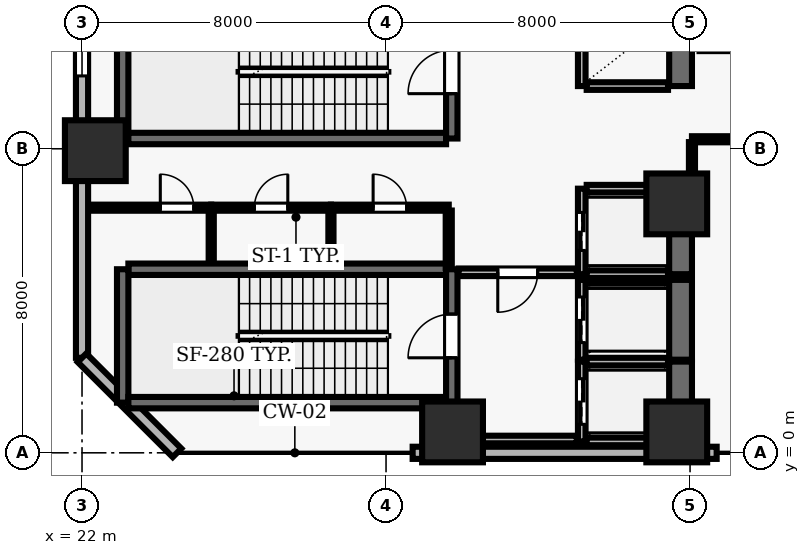
"""IFC4 building model, lengths in metres.
Left out: names, types, materials, properties, quantities, classifications, styles, units other than length and angle.
Written with IfcOpenShell. Run it as: python <this file> out.ifc"""

import sys

from ifc_helpers import new_model, si_unit, direction, frame, frame_2d, origin, origin_2d, place, context, subcontext, project, spatial, rectangle, extrude, element, fill, save


model = new_model("IFC4")
c1 = context("Model", 3, precision=1e-05, world=origin(), true_north=direction((0.0, 1.0)))
c2 = subcontext(c1, "Body", "Model", "MODEL_VIEW")
j1 = project(units=[si_unit("LENGTHUNIT", "METRE"), si_unit("PLANEANGLEUNIT", "RADIAN")], contexts=[c1])
p1 = place(None, origin())
s1 = spatial("IfcSite", under=j1, at=p1, CompositionType="ELEMENT")
p2 = place(p1, origin())
s2 = spatial("IfcBuilding", under=s1, at=p2, CompositionType="ELEMENT")
p3 = place(p2, frame((0.0, 0.0, 20.8)))
s3 = spatial("IfcBuildingStorey", under=s2, at=p3, CompositionType="ELEMENT", Elevation=20.8)
for number, where, z_axis, x_axis in (
    (1, (31.75, 0.55, 0.0), (0.0, 0.0, 1.0), (1.0, 0.0, 0.0)),
    (2, (37.65, 0.55, 0.0), (0.0, 0.0, 1.0), (1.0, 0.0, 0.0)),
    (3, (22.35, 7.95, 0.0), (0.0, 0.0, 1.0), (1.0, 0.0, 0.0)),
    (4, (37.65, 6.55, 0.0), (0.0, 0.0, 1.0), (1.0, 0.0, 0.0)),
):
    element("IfcColumn", number, at=place(p3, frame(where, z_axis=z_axis, x_axis=x_axis)), inside=s3, PredefinedType="COLUMN", context=c2, shape_type="SweptSolid", body=[
        extrude(rectangle(XDim=1.6, YDim=1.6, at=origin_2d()), origin(), (0.0, 0.0, 1.0), 5.2),
    ])
p4 = place(p3, frame((30.7, 0.0, 0.0), z_axis=(0.0, 0.0, 1.0), x_axis=(1.0, 0.0, 0.0)))
e5 = element("IfcWall", 5, at=p4, inside=s3, PredefinedType="SOLIDWALL", context=c2, shape_type="SweptSolid", body=[
    extrude(rectangle(XDim=8.0, YDim=0.32, at=frame_2d((4.0, 0.0))), origin(), (0.0, 0.0, 1.0), 4.78),
])
p5 = place(p3, frame((22.0, 51.5, 0.0), z_axis=(0.0, 0.0, 1.0), x_axis=(0.0, -1.0, 0.0)))
e6 = element("IfcWall", 6, at=p5, inside=s3, PredefinedType="SOLIDWALL", context=c2, shape_type="SweptSolid", body=[
    extrude(rectangle(XDim=49.0, YDim=0.32, at=frame_2d((24.5, 0.0))), origin(), (0.0, 0.0, 1.0), 4.78),
])
p6 = place(p5, frame((1.972, 0.0, 0.9)))
e7 = element("IfcOpeningElement", 7, at=p6, cuts=e6, PredefinedType="OPENING", context=c2, shape_type="SweptSolid", body=[
    extrude(rectangle(XDim=1.5, YDim=1.6, at=frame_2d((0.75, 0.8))), frame((0.0, 0.17, 0.0), z_axis=(0.0, -1.0, 0.0), x_axis=(1.0, 0.0, 0.0)), (0.0, 0.0, 1.0), 0.34),
])
p7 = place(p5, frame((7.417, 0.0, 0.9)))
e8 = element("IfcOpeningElement", 8, at=p7, cuts=e6, PredefinedType="OPENING", context=c2, shape_type="SweptSolid", body=[
    extrude(rectangle(XDim=1.5, YDim=1.6, at=frame_2d((0.75, 0.8))), frame((0.0, 0.17, 0.0), z_axis=(0.0, -1.0, 0.0), x_axis=(1.0, 0.0, 0.0)), (0.0, 0.0, 1.0), 0.34),
])
p8 = place(p5, frame((12.861, 0.0, 0.9)))
e9 = element("IfcOpeningElement", 9, at=p8, cuts=e6, PredefinedType="OPENING", context=c2, shape_type="SweptSolid", body=[
    extrude(rectangle(XDim=1.5, YDim=1.6, at=frame_2d((0.75, 0.8))), frame((0.0, 0.17, 0.0), z_axis=(0.0, -1.0, 0.0), x_axis=(1.0, 0.0, 0.0)), (0.0, 0.0, 1.0), 0.34),
])
p9 = place(p5, frame((18.306, 0.0, 0.9)))
e10 = element("IfcOpeningElement", 10, at=p9, cuts=e6, PredefinedType="OPENING", context=c2, shape_type="SweptSolid", body=[
    extrude(rectangle(XDim=1.5, YDim=1.6, at=frame_2d((0.75, 0.8))), frame((0.0, 0.17, 0.0), z_axis=(0.0, -1.0, 0.0), x_axis=(1.0, 0.0, 0.0)), (0.0, 0.0, 1.0), 0.34),
])
p10 = place(p5, frame((23.3, 0.0, 0.9)))
e11 = element("IfcOpeningElement", 11, at=p10, cuts=e6, PredefinedType="OPENING", context=c2, shape_type="SweptSolid", body=[
    extrude(rectangle(XDim=1.5, YDim=1.6, at=frame_2d((0.75, 0.8))), frame((0.0, 0.17, 0.0), z_axis=(0.0, -1.0, 0.0), x_axis=(1.0, 0.0, 0.0)), (0.0, 0.0, 1.0), 0.34),
])
p11 = place(p5, frame((29.194, 0.0, 0.9)))
e12 = element("IfcOpeningElement", 12, at=p11, cuts=e6, PredefinedType="OPENING", context=c2, shape_type="SweptSolid", body=[
    extrude(rectangle(XDim=1.5, YDim=1.6, at=frame_2d((0.75, 0.8))), frame((0.0, 0.17, 0.0), z_axis=(0.0, -1.0, 0.0), x_axis=(1.0, 0.0, 0.0)), (0.0, 0.0, 1.0), 0.34),
])
p12 = place(p5, frame((34.189, 0.0, 0.9)))
e13 = element("IfcOpeningElement", 13, at=p12, cuts=e6, PredefinedType="OPENING", context=c2, shape_type="SweptSolid", body=[
    extrude(rectangle(XDim=1.5, YDim=1.6, at=frame_2d((0.75, 0.8))), frame((0.0, 0.17, 0.0), z_axis=(0.0, -1.0, 0.0), x_axis=(1.0, 0.0, 0.0)), (0.0, 0.0, 1.0), 0.34),
])
p13 = place(p5, frame((40.083, 0.0, 0.9)))
e14 = element("IfcOpeningElement", 14, at=p13, cuts=e6, PredefinedType="OPENING", context=c2, shape_type="SweptSolid", body=[
    extrude(rectangle(XDim=1.5, YDim=1.6, at=frame_2d((0.75, 0.8))), frame((0.0, 0.17, 0.0), z_axis=(0.0, -1.0, 0.0), x_axis=(1.0, 0.0, 0.0)), (0.0, 0.0, 1.0), 0.34),
])
p14 = place(p3, frame((22.0, 2.5, 0.0), z_axis=(0.0, 0.0, 1.0), x_axis=(0.707106781187, -0.707106781187, 0.0)))
e15 = element("IfcWall", 15, at=p14, inside=s3, PredefinedType="SOLIDWALL", context=c2, shape_type="SweptSolid", body=[
    extrude(rectangle(XDim=3.536, YDim=0.32, at=frame_2d((1.768, 0.0))), origin(), (0.0, 0.0, 1.0), 4.78),
])
p15 = place(p3, frame((31.58, 4.83, 0.0), z_axis=(0.0, 0.0, 1.0), x_axis=(-1.0, 0.0, 0.0)))
e16 = element("IfcWall", 16, at=p15, inside=s3, PredefinedType="SHEAR", context=c2, shape_type="SweptSolid", body=[
    extrude(rectangle(XDim=8.36, YDim=0.3, at=frame_2d((4.18, 0.0))), origin(), (0.0, 0.0, 1.0), 4.78),
])
p16 = place(p3, frame((23.07, 4.83, 0.0), z_axis=(0.0, 0.0, 1.0), x_axis=(0.0, -1.0, 0.0)))
e17 = element("IfcWall", 17, at=p16, inside=s3, PredefinedType="SHEAR", context=c2, shape_type="SweptSolid", body=[
    extrude(rectangle(XDim=3.51, YDim=0.3, at=frame_2d((1.755, 0.0))), origin(), (0.0, 0.0, 1.0), 4.78),
])
p17 = place(p3, frame((23.22, 1.32, 0.0), z_axis=(0.0, 0.0, 1.0), x_axis=(1.0, 0.0, 0.0)))
e18 = element("IfcWall", 18, at=p17, inside=s3, PredefinedType="SHEAR", context=c2, shape_type="SweptSolid", body=[
    extrude(rectangle(XDim=8.36, YDim=0.3, at=frame_2d((4.18, 0.0))), origin(), (0.0, 0.0, 1.0), 4.78),
])
p18 = place(p3, frame((31.73, 0.96, 0.0), z_axis=(0.0, 0.0, 1.0), x_axis=(0.0, 1.0, 0.0)))
e19 = element("IfcWall", 19, at=p18, inside=s3, PredefinedType="SHEAR", context=c2, shape_type="SweptSolid", body=[
    extrude(rectangle(XDim=3.87, YDim=0.3, at=frame_2d((1.935, 0.0))), origin(), (0.0, 0.0, 1.0), 4.78),
])
p19 = place(p18, frame((1.54, 0.0, 0.0)))
e20 = element("IfcOpeningElement", 20, at=p19, cuts=e19, PredefinedType="OPENING", context=c2, shape_type="SweptSolid", body=[
    extrude(rectangle(XDim=1.15, YDim=2.15, at=frame_2d((0.575, 1.075))), frame((0.0, 0.16, 0.0), z_axis=(0.0, -1.0, 0.0), x_axis=(1.0, 0.0, 0.0)), (0.0, 0.0, 1.0), 0.32),
])
p20 = place(p3, frame((23.07, 11.78, 0.0), z_axis=(0.0, 0.0, 1.0), x_axis=(0.0, -1.0, 0.0)))
e21 = element("IfcWall", 21, at=p20, inside=s3, PredefinedType="SHEAR", context=c2, shape_type="SweptSolid", body=[
    extrude(rectangle(XDim=3.51, YDim=0.3, at=frame_2d((1.755, 0.0))), origin(), (0.0, 0.0, 1.0), 4.78),
])
p21 = place(p3, frame((23.22, 8.27, 0.0), z_axis=(0.0, 0.0, 1.0), x_axis=(1.0, 0.0, 0.0)))
e22 = element("IfcWall", 22, at=p21, inside=s3, PredefinedType="SHEAR", context=c2, shape_type="SweptSolid", body=[
    extrude(rectangle(XDim=8.36, YDim=0.3, at=frame_2d((4.18, 0.0))), origin(), (0.0, 0.0, 1.0), 4.78),
])
p22 = place(p3, frame((31.73, 8.27, 0.0), z_axis=(0.0, 0.0, 1.0), x_axis=(0.0, 1.0, 0.0)))
e23 = element("IfcWall", 23, at=p22, inside=s3, PredefinedType="SHEAR", context=c2, shape_type="SweptSolid", body=[
    extrude(rectangle(XDim=3.51, YDim=0.3, at=frame_2d((1.755, 0.0))), origin(), (0.0, 0.0, 1.0), 4.78),
])
p23 = place(p22, frame((1.18, 0.0, 0.0)))
e24 = element("IfcOpeningElement", 24, at=p23, cuts=e23, PredefinedType="OPENING", context=c2, shape_type="SweptSolid", body=[
    extrude(rectangle(XDim=1.15, YDim=2.15, at=frame_2d((0.575, 1.075))), frame((0.0, 0.16, 0.0), z_axis=(0.0, -1.0, 0.0), x_axis=(1.0, 0.0, 0.0)), (0.0, 0.0, 1.0), 0.32),
])
p24 = place(p3, frame((35.15, 2.4, 0.0), z_axis=(0.0, 0.0, 1.0), x_axis=(0.0, -1.0, 0.0)))
e25 = element("IfcWall", 25, at=p24, inside=s3, PredefinedType="SOLIDWALL", context=c2, shape_type="SweptSolid", body=[
    extrude(rectangle(XDim=2.1, YDim=0.2, at=frame_2d((1.05, 0.0))), origin(), (0.0, 0.0, 1.0), 4.78),
])
p25 = place(p24, frame((0.45, 0.0, 0.0)))
e26 = element("IfcOpeningElement", 26, at=p25, cuts=e25, PredefinedType="OPENING", context=c2, shape_type="SweptSolid", body=[
    extrude(rectangle(XDim=1.2, YDim=2.15, at=frame_2d((0.6, 1.075))), frame((0.0, 0.11, 0.0), z_axis=(0.0, -1.0, 0.0), x_axis=(1.0, 0.0, 0.0)), (0.0, 0.0, 1.0), 0.22),
])
p26 = place(p3, frame((37.75, 0.3, 0.0), z_axis=(0.0, 0.0, 1.0), x_axis=(0.0, 1.0, 0.0)))
e27 = element("IfcWall", 27, at=p26, inside=s3, PredefinedType="SHEAR", context=c2, shape_type="SweptSolid", body=[
    extrude(rectangle(XDim=2.1, YDim=0.6, at=frame_2d((1.05, 0.0))), origin(), (0.0, 0.0, 1.0), 4.78),
])
for number, where, z_axis, x_axis in (
    (28, (35.28, 0.3, 0.0), (0.0, 0.0, 1.0), (1.0, 0.0, 0.0)),
    (29, (37.42, 2.4, 0.0), (0.0, 0.0, 1.0), (-1.0, 0.0, 0.0)),
):
    element("IfcWall", number, at=place(p3, frame(where, z_axis=z_axis, x_axis=x_axis)), inside=s3, PredefinedType="SOLIDWALL", context=c2, shape_type="SweptSolid", body=[
        extrude(rectangle(XDim=2.14, YDim=0.2, at=frame_2d((1.07, 0.0))), origin(), (0.0, 0.0, 1.0), 4.78),
    ])
p27 = place(p3, frame((35.15, 4.55, 0.0), z_axis=(0.0, 0.0, 1.0), x_axis=(0.0, -1.0, 0.0)))
e30 = element("IfcWall", 30, at=p27, inside=s3, PredefinedType="SOLIDWALL", context=c2, shape_type="SweptSolid", body=[
    extrude(rectangle(XDim=2.1, YDim=0.2, at=frame_2d((1.05, 0.0))), origin(), (0.0, 0.0, 1.0), 4.78),
])
p28 = place(p27, frame((0.45, 0.0, 0.0)))
e31 = element("IfcOpeningElement", 31, at=p28, cuts=e30, PredefinedType="OPENING", context=c2, shape_type="SweptSolid", body=[
    extrude(rectangle(XDim=1.2, YDim=2.15, at=frame_2d((0.6, 1.075))), frame((0.0, 0.11, 0.0), z_axis=(0.0, -1.0, 0.0), x_axis=(1.0, 0.0, 0.0)), (0.0, 0.0, 1.0), 0.22),
])
p29 = place(p3, frame((37.75, 2.45, 0.0), z_axis=(0.0, 0.0, 1.0), x_axis=(0.0, 1.0, 0.0)))
e32 = element("IfcWall", 32, at=p29, inside=s3, PredefinedType="SHEAR", context=c2, shape_type="SweptSolid", body=[
    extrude(rectangle(XDim=2.1, YDim=0.6, at=frame_2d((1.05, 0.0))), origin(), (0.0, 0.0, 1.0), 4.78),
])
p30 = place(p3, frame((37.42, 4.55, 0.0), z_axis=(0.0, 0.0, 1.0), x_axis=(-1.0, 0.0, 0.0)))
e33 = element("IfcWall", 33, at=p30, inside=s3, PredefinedType="SOLIDWALL", context=c2, shape_type="SweptSolid", body=[
    extrude(rectangle(XDim=2.14, YDim=0.2, at=frame_2d((1.07, 0.0))), origin(), (0.0, 0.0, 1.0), 4.78),
])
p31 = place(p3, frame((35.15, 6.95, 0.0), z_axis=(0.0, 0.0, 1.0), x_axis=(0.0, -1.0, 0.0)))
e34 = element("IfcWall", 34, at=p31, inside=s3, PredefinedType="SOLIDWALL", context=c2, shape_type="SweptSolid", body=[
    extrude(rectangle(XDim=2.25, YDim=0.2, at=frame_2d((1.125, 0.0))), origin(), (0.0, 0.0, 1.0), 4.78),
])
p32 = place(p31, frame((0.625, 0.0, 0.0)))
e35 = element("IfcOpeningElement", 35, at=p32, cuts=e34, PredefinedType="OPENING", context=c2, shape_type="SweptSolid", body=[
    extrude(rectangle(XDim=1.0, YDim=2.1, at=frame_2d((0.5, 1.05))), frame((0.0, 0.11, 0.0), z_axis=(0.0, -1.0, 0.0), x_axis=(1.0, 0.0, 0.0)), (0.0, 0.0, 1.0), 0.22),
])
p33 = place(p3, frame((37.75, 4.7, 0.0), z_axis=(0.0, 0.0, 1.0), x_axis=(0.0, 1.0, 0.0)))
e36 = element("IfcWall", 36, at=p33, inside=s3, PredefinedType="SHEAR", context=c2, shape_type="SweptSolid", body=[
    extrude(rectangle(XDim=2.25, YDim=0.6, at=frame_2d((1.125, 0.0))), origin(), (0.0, 0.0, 1.0), 4.78),
])
for number, where, z_axis, x_axis in (
    (37, (35.28, 4.7, 0.0), (0.0, 0.0, 1.0), (1.0, 0.0, 0.0)),
    (38, (37.42, 6.95, 0.0), (0.0, 0.0, 1.0), (-1.0, 0.0, 0.0)),
):
    element("IfcWall", number, at=place(p3, frame(where, z_axis=z_axis, x_axis=x_axis)), inside=s3, PredefinedType="SOLIDWALL", context=c2, shape_type="SweptSolid", body=[
        extrude(rectangle(XDim=2.14, YDim=0.2, at=frame_2d((1.07, 0.0))), origin(), (0.0, 0.0, 1.0), 4.78),
    ])
p34 = place(p3, frame((35.15, 11.55, 0.0), z_axis=(0.0, 0.0, 1.0), x_axis=(0.0, -1.0, 0.0)))
e39 = element("IfcWall", 39, at=p34, inside=s3, PredefinedType="SOLIDWALL", context=c2, shape_type="SweptSolid", body=[
    extrude(rectangle(XDim=1.9, YDim=0.2, at=frame_2d((0.95, 0.0))), origin(), (0.0, 0.0, 1.0), 4.78),
])
p35 = place(p3, frame((37.75, 9.65, 0.0), z_axis=(0.0, 0.0, 1.0), x_axis=(0.0, 1.0, 0.0)))
e40 = element("IfcWall", 40, at=p35, inside=s3, PredefinedType="SHEAR", context=c2, shape_type="SweptSolid", body=[
    extrude(rectangle(XDim=1.9, YDim=0.6, at=frame_2d((0.95, 0.0))), origin(), (0.0, 0.0, 1.0), 4.78),
])
p36 = place(p3, frame((35.28, 9.65, 0.0), z_axis=(0.0, 0.0, 1.0), x_axis=(1.0, 0.0, 0.0)))
e41 = element("IfcWall", 41, at=p36, inside=s3, PredefinedType="SOLIDWALL", context=c2, shape_type="SweptSolid", body=[
    extrude(rectangle(XDim=2.14, YDim=0.2, at=frame_2d((1.07, 0.0))), origin(), (0.0, 0.0, 1.0), 4.78),
])
p37 = place(p3, frame((22.2, 6.45, 0.0), z_axis=(0.0, 0.0, 1.0), x_axis=(1.0, 0.0, 0.0)))
e42 = element("IfcWall", 42, at=p37, inside=s3, PredefinedType="PARTITIONING", context=c2, shape_type="SweptSolid", body=[
    extrude(rectangle(XDim=3.2, YDim=0.16, at=frame_2d((1.6, 0.0))), origin(), (0.0, 0.0, 1.0), 4.78),
])
p38 = place(p37, frame((1.86, 0.0, 0.0)))
e43 = element("IfcOpeningElement", 43, at=p38, cuts=e42, PredefinedType="OPENING", context=c2, shape_type="SweptSolid", body=[
    extrude(rectangle(XDim=0.88, YDim=2.1, at=frame_2d((0.44, 1.05))), frame((0.0, 0.09, 0.0), z_axis=(0.0, -1.0, 0.0), x_axis=(1.0, 0.0, 0.0)), (0.0, 0.0, 1.0), 0.18),
])
p39 = place(p3, frame((25.4, 6.45, 0.0), z_axis=(0.0, 0.0, 1.0), x_axis=(1.0, 0.0, 0.0)))
e44 = element("IfcWall", 44, at=p39, inside=s3, PredefinedType="PARTITIONING", context=c2, shape_type="SweptSolid", body=[
    extrude(rectangle(XDim=3.15, YDim=0.16, at=frame_2d((1.575, 0.0))), origin(), (0.0, 0.0, 1.0), 4.78),
])
p40 = place(p39, frame((1.135, 0.0, 0.0)))
e45 = element("IfcOpeningElement", 45, at=p40, cuts=e44, PredefinedType="OPENING", context=c2, shape_type="SweptSolid", body=[
    extrude(rectangle(XDim=0.88, YDim=2.1, at=frame_2d((0.44, 1.05))), frame((0.0, 0.09, 0.0), z_axis=(0.0, -1.0, 0.0), x_axis=(1.0, 0.0, 0.0)), (0.0, 0.0, 1.0), 0.18),
])
p41 = place(p3, frame((28.55, 6.45, 0.0), z_axis=(0.0, 0.0, 1.0), x_axis=(1.0, 0.0, 0.0)))
e46 = element("IfcWall", 46, at=p41, inside=s3, PredefinedType="PARTITIONING", context=c2, shape_type="SweptSolid", body=[
    extrude(rectangle(XDim=3.1, YDim=0.16, at=frame_2d((1.55, 0.0))), origin(), (0.0, 0.0, 1.0), 4.78),
])
p42 = place(p41, frame((1.11, 0.0, 0.0)))
e47 = element("IfcOpeningElement", 47, at=p42, cuts=e46, PredefinedType="OPENING", context=c2, shape_type="SweptSolid", body=[
    extrude(rectangle(XDim=0.88, YDim=2.1, at=frame_2d((0.44, 1.05))), frame((0.0, 0.09, 0.0), z_axis=(0.0, -1.0, 0.0), x_axis=(1.0, 0.0, 0.0)), (0.0, 0.0, 1.0), 0.18),
])
p43 = place(p3, frame((31.65, 0.35, 0.0), z_axis=(0.0, 0.0, 1.0), x_axis=(1.0, 0.0, 0.0)))
e48 = element("IfcWall", 48, at=p43, inside=s3, PredefinedType="SOLIDWALL", context=c2, shape_type="SweptSolid", body=[
    extrude(rectangle(XDim=3.37, YDim=0.2, at=frame_2d((1.685, 0.0))), origin(), (0.0, 0.0, 1.0), 4.78),
])
p44 = place(p3, frame((35.02, 4.75, 0.0), z_axis=(0.0, 0.0, 1.0), x_axis=(-1.0, 0.0, 0.0)))
e49 = element("IfcWall", 49, at=p44, inside=s3, PredefinedType="SOLIDWALL", context=c2, shape_type="SweptSolid", body=[
    extrude(rectangle(XDim=3.11, YDim=0.2, at=frame_2d((1.555, 0.0))), origin(), (0.0, 0.0, 1.0), 4.78),
])
p45 = place(p44, frame((1.03, 0.0, 0.0)))
e50 = element("IfcOpeningElement", 50, at=p45, cuts=e49, PredefinedType="OPENING", context=c2, shape_type="SweptSolid", body=[
    extrude(rectangle(XDim=1.05, YDim=2.15, at=frame_2d((0.525, 1.075))), frame((0.0, 0.11, 0.0), z_axis=(0.0, -1.0, 0.0), x_axis=(1.0, 0.0, 0.0)), (0.0, 0.0, 1.0), 0.22),
])
p46 = place(p3, frame((38.05, 8.25, 0.0), z_axis=(0.0, 0.0, 1.0), x_axis=(1.0, 0.0, 0.0)))
e51 = element("IfcWall", 51, at=p46, inside=s3, PredefinedType="PARTITIONING", context=c2, shape_type="SweptSolid", body=[
    extrude(rectangle(XDim=25.15, YDim=0.16, at=frame_2d((12.575, 0.0))), origin(), (0.0, 0.0, 1.0), 3.768),
])
p47 = place(p46, frame((10.675, 0.0, 0.0)))
e52 = element("IfcOpeningElement", 52, at=p47, cuts=e51, PredefinedType="OPENING", context=c2, shape_type="SweptSolid", body=[
    extrude(rectangle(XDim=1.0, YDim=2.1, at=frame_2d((0.5, 1.05))), frame((0.0, 0.09, 0.0), z_axis=(0.0, -1.0, 0.0), x_axis=(1.0, 0.0, 0.0)), (0.0, 0.0, 1.0), 0.18),
])
for number, where, z_axis, x_axis in (
    (53, (25.4, 5.01, 0.0), (0.0, 0.0, 1.0), (0.0, 1.0, 0.0)),
    (54, (28.55, 5.01, 0.0), (0.0, 0.0, 1.0), (0.0, 1.0, 0.0)),
):
    element("IfcWall", number, at=place(p3, frame(where, z_axis=z_axis, x_axis=x_axis)), inside=s3, PredefinedType="PARTITIONING", context=c2, shape_type="SweptSolid", body=[
        extrude(rectangle(XDim=1.365, YDim=0.135, at=frame_2d((0.683, 0.0))), origin(), (0.0, 0.0, 1.0), 4.78),
    ])
p48 = place(p3, frame((31.65, 4.86, 0.0), z_axis=(0.0, 0.0, 1.0), x_axis=(0.0, 1.0, 0.0)))
e55 = element("IfcWall", 55, at=p48, inside=s3, PredefinedType="PARTITIONING", context=c2, shape_type="SweptSolid", body=[
    extrude(rectangle(XDim=1.515, YDim=0.16, at=frame_2d((0.757, 0.0))), origin(), (0.0, 0.0, 1.0), 4.78),
])
p49 = place(p3, frame((38.05, 7.05, 0.0), z_axis=(0.0, 0.0, 1.0), x_axis=(0.0, 1.0, 0.0)))
e56 = element("IfcWall", 56, at=p49, inside=s3, PredefinedType="PARTITIONING", context=c2, shape_type="SweptSolid", body=[
    extrude(rectangle(XDim=1.125, YDim=0.16, at=frame_2d((0.562, 0.0))), origin(), (0.0, 0.0, 1.0), 3.768),
])
p50 = place(p13, origin())
e57 = element("IfcWindow", 57, at=p50, inside=s3, PartitioningType="SINGLE_PANEL", PredefinedType="WINDOW", context=c2, shape_type="SweptSolid", body=[
    extrude(rectangle(XDim=1.5, YDim=1.6, at=frame_2d((0.75, 0.8))), frame((0.0, 0.03, 0.0), z_axis=(0.0, -1.0, 0.0), x_axis=(1.0, 0.0, 0.0)), (0.0, 0.0, 1.0), 0.06),
])
fill(e14, e57)
p51 = place(p19, origin())
e58 = element("IfcDoor", 58, at=p51, inside=s3, OperationType="SINGLE_SWING_LEFT", PredefinedType="DOOR", context=c2, shape_type="SweptSolid", body=[
    extrude(rectangle(XDim=1.15, YDim=2.15, at=frame_2d((0.575, 1.075))), frame((0.0, 0.025, 0.0), z_axis=(0.0, -1.0, 0.0), x_axis=(1.0, 0.0, 0.0)), (0.0, 0.0, 1.0), 0.05),
])
fill(e20, e58)
p52 = place(p23, origin())
e59 = element("IfcDoor", 59, at=p52, inside=s3, OperationType="SINGLE_SWING_LEFT", PredefinedType="DOOR", context=c2, shape_type="SweptSolid", body=[
    extrude(rectangle(XDim=1.15, YDim=2.15, at=frame_2d((0.575, 1.075))), frame((0.0, 0.025, 0.0), z_axis=(0.0, -1.0, 0.0), x_axis=(1.0, 0.0, 0.0)), (0.0, 0.0, 1.0), 0.05),
])
fill(e24, e59)
p53 = place(p25, origin())
e60 = element("IfcDoor", 60, at=p53, inside=s3, OperationType="DOUBLE_DOOR_SLIDING", PredefinedType="DOOR", context=c2, shape_type="SweptSolid", body=[
    extrude(rectangle(XDim=1.2, YDim=2.15, at=frame_2d((0.6, 1.075))), frame((0.0, 0.025, 0.0), z_axis=(0.0, -1.0, 0.0), x_axis=(1.0, 0.0, 0.0)), (0.0, 0.0, 1.0), 0.05),
])
fill(e26, e60)
p54 = place(p28, origin())
e61 = element("IfcDoor", 61, at=p54, inside=s3, OperationType="DOUBLE_DOOR_SLIDING", PredefinedType="DOOR", context=c2, shape_type="SweptSolid", body=[
    extrude(rectangle(XDim=1.2, YDim=2.15, at=frame_2d((0.6, 1.075))), frame((0.0, 0.025, 0.0), z_axis=(0.0, -1.0, 0.0), x_axis=(1.0, 0.0, 0.0)), (0.0, 0.0, 1.0), 0.05),
])
fill(e31, e61)
p55 = place(p32, origin())
e62 = element("IfcDoor", 62, at=p55, inside=s3, OperationType="DOUBLE_DOOR_SLIDING", PredefinedType="DOOR", context=c2, shape_type="SweptSolid", body=[
    extrude(rectangle(XDim=1.0, YDim=2.1, at=frame_2d((0.5, 1.05))), frame((0.0, 0.025, 0.0), z_axis=(0.0, -1.0, 0.0), x_axis=(1.0, 0.0, 0.0)), (0.0, 0.0, 1.0), 0.05),
])
fill(e35, e62)
p56 = place(p45, origin())
e63 = element("IfcDoor", 63, at=p56, inside=s3, OperationType="SINGLE_SWING_RIGHT", PredefinedType="DOOR", context=c2, shape_type="SweptSolid", body=[
    extrude(rectangle(XDim=1.05, YDim=2.15, at=frame_2d((0.525, 1.075))), frame((0.0, 0.025, 0.0), z_axis=(0.0, -1.0, 0.0), x_axis=(1.0, 0.0, 0.0)), (0.0, 0.0, 1.0), 0.05),
])
fill(e50, e63)
p57 = place(p38, origin())
e64 = element("IfcDoor", 64, at=p57, inside=s3, OperationType="SINGLE_SWING_LEFT", PredefinedType="DOOR", context=c2, shape_type="SweptSolid", body=[
    extrude(rectangle(XDim=0.88, YDim=2.1, at=frame_2d((0.44, 1.05))), frame((0.0, 0.025, 0.0), z_axis=(0.0, -1.0, 0.0), x_axis=(1.0, 0.0, 0.0)), (0.0, 0.0, 1.0), 0.05),
])
fill(e43, e64)
p58 = place(p40, origin())
e65 = element("IfcDoor", 65, at=p58, inside=s3, OperationType="SINGLE_SWING_RIGHT", PredefinedType="DOOR", context=c2, shape_type="SweptSolid", body=[
    extrude(rectangle(XDim=0.88, YDim=2.1, at=frame_2d((0.44, 1.05))), frame((0.0, 0.025, 0.0), z_axis=(0.0, -1.0, 0.0), x_axis=(1.0, 0.0, 0.0)), (0.0, 0.0, 1.0), 0.05),
])
fill(e45, e65)
p59 = place(p42, origin())
e66 = element("IfcDoor", 66, at=p59, inside=s3, OperationType="SINGLE_SWING_LEFT", PredefinedType="DOOR", context=c2, shape_type="SweptSolid", body=[
    extrude(rectangle(XDim=0.88, YDim=2.1, at=frame_2d((0.44, 1.05))), frame((0.0, 0.025, 0.0), z_axis=(0.0, -1.0, 0.0), x_axis=(1.0, 0.0, 0.0)), (0.0, 0.0, 1.0), 0.05),
])
fill(e47, e66)
save(model, sys.argv[1])
